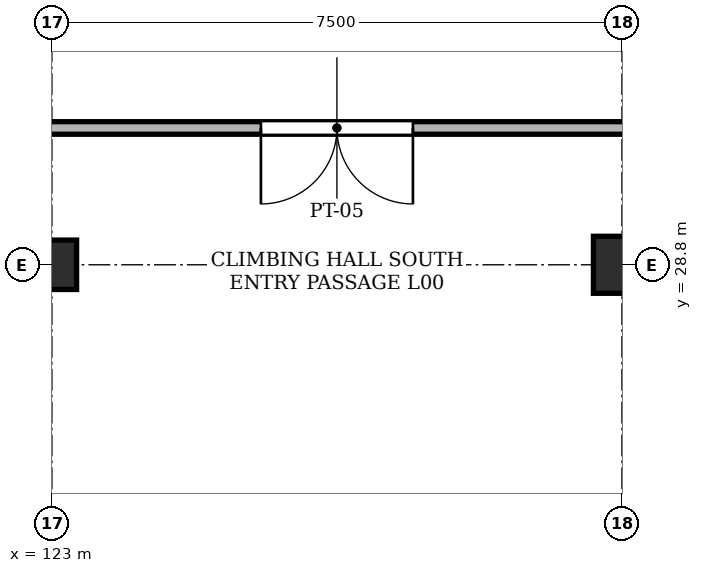
"""IFC4 building model, lengths in metres.
Left out: names, types, materials, properties, quantities, classifications, styles, units other than length and angle.
Written with IfcOpenShell. Run it as: python <this file> out.ifc"""

import sys

from ifc_helpers import new_model, si_unit, direction, frame, frame_2d, origin, origin_2d, place, context, subcontext, project, spatial, rectangle, extrude, element, fill, save


model = new_model("IFC4")
c1 = context("Model", 3, precision=1e-05, world=origin(), true_north=direction((0.0, 1.0)))
c2 = subcontext(c1, "Body", "Model", "MODEL_VIEW")
j1 = project(units=[si_unit("LENGTHUNIT", "METRE"), si_unit("PLANEANGLEUNIT", "RADIAN")], contexts=[c1])
p1 = place(None, origin())
s1 = spatial("IfcSite", under=j1, at=p1, CompositionType="ELEMENT")
p2 = place(p1, origin())
s2 = spatial("IfcBuilding", under=s1, at=p2, CompositionType="ELEMENT")
p3 = place(p2, origin())
s3 = spatial("IfcBuildingStorey", under=s2, at=p3, CompositionType="ELEMENT", Elevation=0.0)
p4 = place(p3, frame((123.0, 28.8, -0.35), z_axis=(0.0, 0.0, 1.0), x_axis=(1.0, 0.0, 0.0)))
e1 = element("IfcColumn", 1, at=p4, inside=s3, PredefinedType="COLUMN", context=c2, shape_type="SweptSolid", body=[
    extrude(rectangle(XDim=0.65, YDim=0.65, at=origin_2d()), origin(), (0.0, 0.0, 1.0), 4.65),
])
p5 = place(p3, frame((130.5, 28.8, -0.35), z_axis=(0.0, 0.0, 1.0), x_axis=(1.0, 0.0, 0.0)))
e2 = element("IfcColumn", 2, at=p5, inside=s3, PredefinedType="COLUMN", context=c2, shape_type="SweptSolid", body=[
    extrude(rectangle(XDim=0.75, YDim=0.75, at=origin_2d()), origin(), (0.0, 0.0, 1.0), 4.65),
])
p6 = place(p3, frame((117.3, 30.6, 0.0), z_axis=(0.0, 0.0, 1.0), x_axis=(1.0, 0.0, 0.0)))
e3 = element("IfcWall", 3, at=p6, inside=s3, PredefinedType="PARTITIONING", context=c2, shape_type="SweptSolid", body=[
    extrude(rectangle(XDim=18.9, YDim=0.165, at=frame_2d((9.45, 0.0))), origin(), (0.0, 0.0, 1.0), 3.88),
])
p7 = place(p6, frame((8.45, 0.0, 0.0)))
e4 = element("IfcOpeningElement", 4, at=p7, cuts=e3, PredefinedType="OPENING", context=c2, shape_type="SweptSolid", body=[
    extrude(rectangle(XDim=2.0, YDim=2.35, at=frame_2d((1.0, 1.175))), frame((0.0, 0.094, 0.0), z_axis=(0.0, -1.0, 0.0), x_axis=(1.0, 0.0, 0.0)), (0.0, 0.0, 1.0), 0.189),
])
p8 = place(p7, frame((2.0, 0.0, 0.0), z_axis=(0.0, 0.0, 1.0), x_axis=(-1.0, 0.0, 0.0)))
e5 = element("IfcDoor", 5, at=p8, inside=s3, OperationType="DOUBLE_DOOR_SINGLE_SWING", PredefinedType="DOOR", context=c2, shape_type="SweptSolid", body=[
    extrude(rectangle(XDim=2.0, YDim=2.35, at=frame_2d((1.0, 1.175))), frame((0.0, 0.025, 0.0), z_axis=(0.0, -1.0, 0.0), x_axis=(1.0, 0.0, 0.0)), (0.0, 0.0, 1.0), 0.05),
])
fill(e4, e5)
save(model, sys.argv[1])
